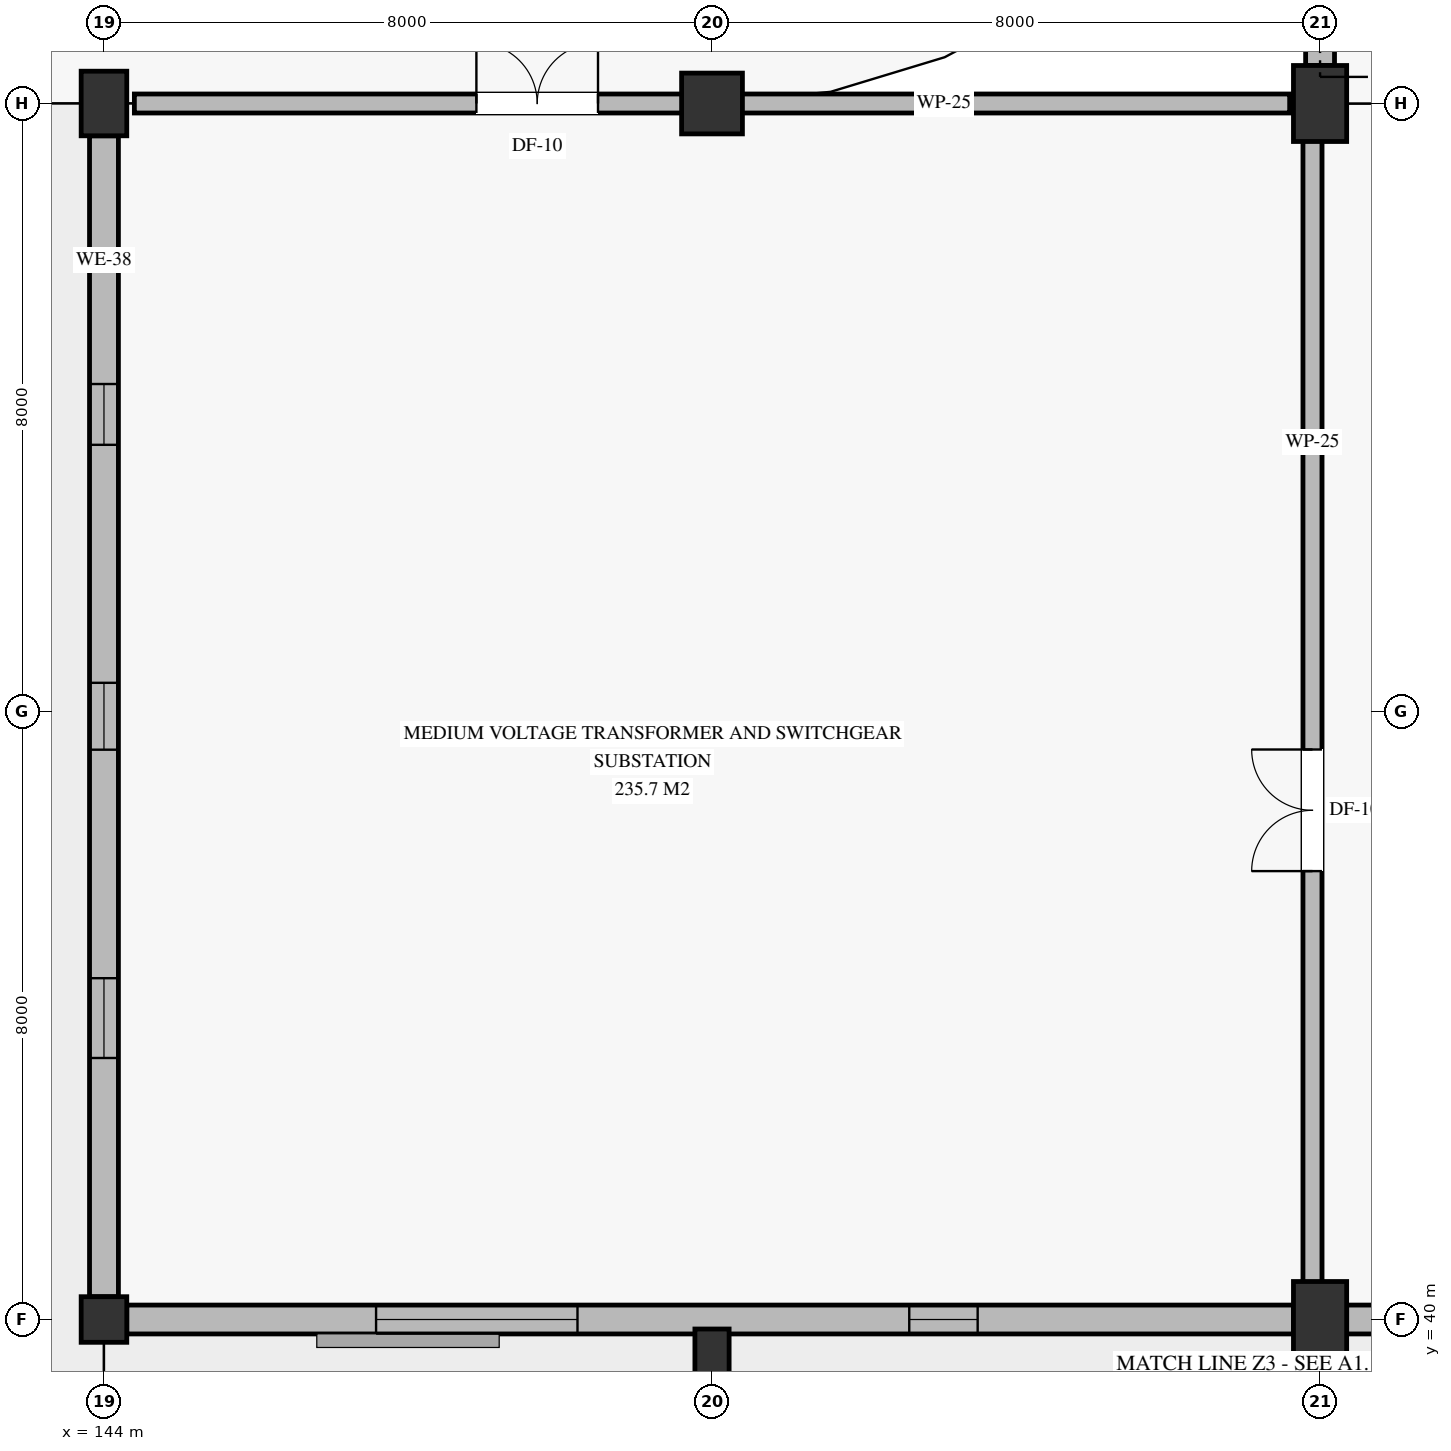
"""IFC4 building model, lengths in metres.
Left out: names, types, materials, properties, quantities, classifications, styles, units other than length and angle.
Written with IfcOpenShell. Run it as: python <this file> out.ifc"""

import sys

from ifc_helpers import new_model, si_unit, direction, frame, frame_2d, origin, origin_2d, place, context, subcontext, project, spatial, rectangle, extrude, element, fill, save


model = new_model("IFC4")
c1 = context("Model", 3, precision=1e-05, world=origin(), true_north=direction((0.0, 1.0)))
c2 = subcontext(c1, "Body", "Model", "MODEL_VIEW")
j1 = project(units=[si_unit("LENGTHUNIT", "METRE"), si_unit("PLANEANGLEUNIT", "RADIAN")], contexts=[c1])
p1 = place(None, origin())
s1 = spatial("IfcSite", under=j1, at=p1, CompositionType="ELEMENT")
p2 = place(p1, origin())
s2 = spatial("IfcBuilding", under=s1, at=p2, CompositionType="ELEMENT")
p3 = place(p2, origin())
s3 = spatial("IfcBuildingStorey", under=s2, at=p3, CompositionType="ELEMENT", Elevation=0.0)
p4 = place(p3, frame((144.0, 56.0, 0.0), z_axis=(0.0, 0.0, 1.0), x_axis=(1.0, 0.0, 0.0)))
e1 = element("IfcColumn", 1, at=p4, inside=s3, PredefinedType="COLUMN", context=c2, shape_type="SweptSolid", body=[
    extrude(rectangle(XDim=0.6, YDim=0.85, at=origin_2d()), origin(), (0.0, 0.0, 1.0), 4.8),
])
p5 = place(p3, frame((152.0, 56.0, 0.0), z_axis=(0.0, 0.0, 1.0), x_axis=(1.0, 0.0, 0.0)))
e2 = element("IfcColumn", 2, at=p5, inside=s3, PredefinedType="COLUMN", context=c2, shape_type="SweptSolid", body=[
    extrude(rectangle(XDim=0.8, YDim=0.8, at=origin_2d()), origin(), (0.0, 0.0, 1.0), 4.8),
])
p6 = place(p3, frame((144.0, 40.0, 0.0), z_axis=(0.0, 0.0, 1.0), x_axis=(1.0, 0.0, 0.0)))
e3 = element("IfcColumn", 3, at=p6, inside=s3, PredefinedType="COLUMN", context=c2, shape_type="SweptSolid", body=[
    extrude(rectangle(XDim=0.6, YDim=0.6, at=origin_2d()), origin(), (0.0, 0.0, 1.0), 4.8),
])
for number, where, z_axis, x_axis in (
    (4, (160.0, 40.0, 0.0), (0.0, 0.0, 1.0), (1.0, 0.0, 0.0)),
    (5, (160.0, 56.0, 0.0), (0.0, 0.0, 1.0), (1.0, 0.0, 0.0)),
):
    element("IfcColumn", number, at=place(p3, frame(where, z_axis=z_axis, x_axis=x_axis)), inside=s3, PredefinedType="COLUMN", context=c2, shape_type="SweptSolid", body=[
        extrude(rectangle(XDim=0.7, YDim=1.0, at=origin_2d()), origin(), (0.0, 0.0, 1.0), 4.8),
    ])
p7 = place(p3, frame((152.0, 39.55, 0.0), z_axis=(0.0, 0.0, 1.0), x_axis=(1.0, 0.0, 0.0)))
e6 = element("IfcColumn", 6, at=p7, inside=s3, PredefinedType="PILASTER", context=c2, shape_type="SweptSolid", body=[
    extrude(rectangle(XDim=0.45, YDim=0.65, at=origin_2d()), origin(), (0.0, 0.0, 1.0), 4.8),
])
p8 = place(p3, frame((173.65, 40.0, 0.0), z_axis=(0.0, 0.0, 1.0), x_axis=(-1.0, 0.0, 0.0)))
e7 = element("IfcWall", 7, at=p8, inside=s3, PredefinedType="STANDARD", context=c2, shape_type="SweptSolid", body=[
    extrude(rectangle(XDim=13.3, YDim=0.38, at=frame_2d((6.65, 0.0))), origin(), (0.0, 0.0, 1.0), 3.17),
])
p9 = place(p8, frame((3.465, 0.0, 0.45)))
e8 = element("IfcOpeningElement", 8, at=p9, cuts=e7, PredefinedType="OPENING", context=c2, shape_type="SweptSolid", body=[
    extrude(rectangle(XDim=1.05, YDim=2.5, at=frame_2d((0.525, 1.25))), frame((0.0, 0.2, 0.0), z_axis=(0.0, -1.0, 0.0), x_axis=(1.0, 0.0, 0.0)), (0.0, 0.0, 1.0), 0.4),
])
p10 = place(p8, frame((8.135, 0.0, 0.85)))
e9 = element("IfcOpeningElement", 9, at=p10, cuts=e7, PredefinedType="OPENING", context=c2, shape_type="SweptSolid", body=[
    extrude(rectangle(XDim=2.35, YDim=1.95, at=frame_2d((1.175, 0.975))), frame((0.0, 0.2, 0.0), z_axis=(0.0, -1.0, 0.0), x_axis=(1.0, 0.0, 0.0)), (0.0, 0.0, 1.0), 0.4),
])
p11 = place(p3, frame((159.65, 40.0, 0.0), z_axis=(0.0, 0.0, 1.0), x_axis=(-1.0, 0.0, 0.0)))
e10 = element("IfcWall", 10, at=p11, inside=s3, PredefinedType="STANDARD", context=c2, shape_type="SweptSolid", body=[
    extrude(rectangle(XDim=15.35, YDim=0.38, at=frame_2d((7.675, 0.0))), origin(), (0.0, 0.0, 1.0), 3.17),
])
p12 = place(p11, frame((4.155, 0.0, 0.6)))
e11 = element("IfcOpeningElement", 11, at=p12, cuts=e10, PredefinedType="OPENING", context=c2, shape_type="SweptSolid", body=[
    extrude(rectangle(XDim=0.9, YDim=2.35, at=frame_2d((0.45, 1.175))), frame((0.0, 0.2, 0.0), z_axis=(0.0, -1.0, 0.0), x_axis=(1.0, 0.0, 0.0)), (0.0, 0.0, 1.0), 0.4),
])
p13 = place(p11, frame((9.42, 0.0, 0.8)))
e12 = element("IfcOpeningElement", 12, at=p13, cuts=e10, PredefinedType="OPENING", context=c2, shape_type="SweptSolid", body=[
    extrude(rectangle(XDim=2.65, YDim=2.15, at=frame_2d((1.325, 1.075))), frame((0.0, 0.2, 0.0), z_axis=(0.0, -1.0, 0.0), x_axis=(1.0, 0.0, 0.0)), (0.0, 0.0, 1.0), 0.4),
])
p14 = place(p3, frame((144.0, 40.3, 0.0), z_axis=(0.0, 0.0, 1.0), x_axis=(0.0, 1.0, 0.0)))
e13 = element("IfcWall", 13, at=p14, inside=s3, PredefinedType="STANDARD", context=c2, shape_type="SweptSolid", body=[
    extrude(rectangle(XDim=15.275, YDim=0.38, at=frame_2d((7.637, 0.0))), origin(), (0.0, 0.0, 1.0), 2.97),
])
p15 = place(p14, frame((3.141, 0.0, 0.35)))
e14 = element("IfcOpeningElement", 14, at=p15, cuts=e13, PredefinedType="OPENING", context=c2, shape_type="SweptSolid", body=[
    extrude(rectangle(XDim=1.05, YDim=2.44, at=frame_2d((0.525, 1.22))), frame((0.0, 0.2, 0.0), z_axis=(0.0, -1.0, 0.0), x_axis=(1.0, 0.0, 0.0)), (0.0, 0.0, 1.0), 0.4),
])
p16 = place(p14, frame((7.198, 0.0, 0.8)))
e15 = element("IfcOpeningElement", 15, at=p16, cuts=e13, PredefinedType="OPENING", context=c2, shape_type="SweptSolid", body=[
    extrude(rectangle(XDim=0.88, YDim=1.95, at=frame_2d((0.44, 0.975))), frame((0.0, 0.2, 0.0), z_axis=(0.0, -1.0, 0.0), x_axis=(1.0, 0.0, 0.0)), (0.0, 0.0, 1.0), 0.4),
])
p17 = place(p14, frame((11.209, 0.0, 0.7)))
e16 = element("IfcOpeningElement", 16, at=p17, cuts=e13, PredefinedType="OPENING", context=c2, shape_type="SweptSolid", body=[
    extrude(rectangle(XDim=0.8, YDim=2.05, at=frame_2d((0.4, 1.025))), frame((0.0, 0.2, 0.0), z_axis=(0.0, -1.0, 0.0), x_axis=(1.0, 0.0, 0.0)), (0.0, 0.0, 1.0), 0.4),
])
p18 = place(p3, frame((160.0, 56.5, 0.0), z_axis=(0.0, 0.0, 1.0), x_axis=(0.0, 1.0, 0.0)))
e17 = element("IfcWall", 17, at=p18, inside=s3, PredefinedType="STANDARD", context=c2, shape_type="SweptSolid", body=[
    extrude(rectangle(XDim=15.0, YDim=0.38, at=frame_2d((7.5, 0.0))), origin(), (0.0, 0.0, 1.0), 3.7),
])
p19 = place(p18, frame((10.575, 0.0, 0.85)))
e18 = element("IfcOpeningElement", 18, at=p19, cuts=e17, PredefinedType="OPENING", context=c2, shape_type="SweptSolid", body=[
    extrude(rectangle(XDim=1.05, YDim=2.5, at=frame_2d((0.525, 1.25))), frame((0.0, 0.2, 0.0), z_axis=(0.0, -1.0, 0.0), x_axis=(1.0, 0.0, 0.0)), (0.0, 0.0, 1.0), 0.4),
])
p20 = place(p18, frame((2.2, 0.0, 0.0)))
e19 = element("IfcOpeningElement", 19, at=p20, cuts=e17, PredefinedType="OPENING", context=c2, shape_type="SweptSolid", body=[
    extrude(rectangle(XDim=2.2, YDim=2.6, at=frame_2d((1.1, 1.3))), frame((0.0, 0.2, 0.0), z_axis=(0.0, -1.0, 0.0), x_axis=(1.0, 0.0, 0.0)), (0.0, 0.0, 1.0), 0.4),
])
p21 = place(p3, frame((159.9, 40.4, 0.0), z_axis=(0.0, 0.0, 1.0), x_axis=(0.0, 1.0, 0.0)))
e20 = element("IfcWall", 20, at=p21, inside=s3, PredefinedType="PARTITIONING", context=c2, shape_type="SweptSolid", body=[
    extrude(rectangle(XDim=15.2, YDim=0.25, at=frame_2d((7.6, 0.0))), origin(), (0.0, 0.0, 1.0), 2.962),
])
p22 = place(p21, frame((5.5, 0.0, 0.0)))
e21 = element("IfcOpeningElement", 21, at=p22, cuts=e20, PredefinedType="OPENING", context=c2, shape_type="SweptSolid", body=[
    extrude(rectangle(XDim=1.6, YDim=2.3, at=frame_2d((0.8, 1.15))), frame((0.0, 0.135, 0.0), z_axis=(0.0, -1.0, 0.0), x_axis=(1.0, 0.0, 0.0)), (0.0, 0.0, 1.0), 0.27),
])
p23 = place(p3, frame((144.4, 56.0, 0.0), z_axis=(0.0, 0.0, 1.0), x_axis=(1.0, 0.0, 0.0)))
e22 = element("IfcWall", 22, at=p23, inside=s3, PredefinedType="PARTITIONING", context=c2, shape_type="SweptSolid", body=[
    extrude(rectangle(XDim=15.2, YDim=0.25, at=frame_2d((7.6, 0.0))), origin(), (0.0, 0.0, 1.0), 2.842),
])
p24 = place(p23, frame((4.5, 0.0, 0.0)))
e23 = element("IfcOpeningElement", 23, at=p24, cuts=e22, PredefinedType="OPENING", context=c2, shape_type="SweptSolid", body=[
    extrude(rectangle(XDim=1.6, YDim=2.3, at=frame_2d((0.8, 1.15))), frame((0.0, 0.135, 0.0), z_axis=(0.0, -1.0, 0.0), x_axis=(1.0, 0.0, 0.0)), (0.0, 0.0, 1.0), 0.27),
])
p25 = place(p12, origin())
e24 = element("IfcWindow", 24, at=p25, inside=s3, PartitioningType="SINGLE_PANEL", PredefinedType="WINDOW", context=c2, shape_type="SweptSolid", body=[
    extrude(rectangle(XDim=0.9, YDim=2.35, at=frame_2d((0.45, 1.175))), frame((0.0, 0.03, 0.0), z_axis=(0.0, -1.0, 0.0), x_axis=(1.0, 0.0, 0.0)), (0.0, 0.0, 1.0), 0.06),
])
fill(e11, e24)
p26 = place(p13, origin())
e25 = element("IfcWindow", 25, at=p26, inside=s3, PartitioningType="SINGLE_PANEL", PredefinedType="WINDOW", context=c2, shape_type="SweptSolid", body=[
    extrude(rectangle(XDim=2.65, YDim=2.15, at=frame_2d((1.325, 1.075))), frame((0.0, 0.03, 0.0), z_axis=(0.0, -1.0, 0.0), x_axis=(1.0, 0.0, 0.0)), (0.0, 0.0, 1.0), 0.06),
])
fill(e12, e25)
p27 = place(p15, origin())
e26 = element("IfcWindow", 26, at=p27, inside=s3, PartitioningType="SINGLE_PANEL", PredefinedType="WINDOW", context=c2, shape_type="SweptSolid", body=[
    extrude(rectangle(XDim=1.05, YDim=2.44, at=frame_2d((0.525, 1.22))), frame((0.0, 0.03, 0.0), z_axis=(0.0, -1.0, 0.0), x_axis=(1.0, 0.0, 0.0)), (0.0, 0.0, 1.0), 0.06),
])
fill(e14, e26)
p28 = place(p16, origin())
e27 = element("IfcWindow", 27, at=p28, inside=s3, PartitioningType="SINGLE_PANEL", PredefinedType="WINDOW", context=c2, shape_type="SweptSolid", body=[
    extrude(rectangle(XDim=0.88, YDim=1.95, at=frame_2d((0.44, 0.975))), frame((0.0, 0.03, 0.0), z_axis=(0.0, -1.0, 0.0), x_axis=(1.0, 0.0, 0.0)), (0.0, 0.0, 1.0), 0.06),
])
fill(e15, e27)
p29 = place(p17, origin())
e28 = element("IfcWindow", 28, at=p29, inside=s3, PartitioningType="SINGLE_PANEL", PredefinedType="WINDOW", context=c2, shape_type="SweptSolid", body=[
    extrude(rectangle(XDim=0.8, YDim=2.05, at=frame_2d((0.4, 1.025))), frame((0.0, 0.03, 0.0), z_axis=(0.0, -1.0, 0.0), x_axis=(1.0, 0.0, 0.0)), (0.0, 0.0, 1.0), 0.06),
])
fill(e16, e28)
p30 = place(p22, origin())
e29 = element("IfcDoor", 29, at=p30, inside=s3, OperationType="DOUBLE_DOOR_SINGLE_SWING", PredefinedType="DOOR", context=c2, shape_type="SweptSolid", body=[
    extrude(rectangle(XDim=1.6, YDim=2.3, at=frame_2d((0.8, 1.15))), frame((0.0, 0.025, 0.0), z_axis=(0.0, -1.0, 0.0), x_axis=(1.0, 0.0, 0.0)), (0.0, 0.0, 1.0), 0.05),
])
fill(e21, e29)
p31 = place(p24, origin())
e30 = element("IfcDoor", 30, at=p31, inside=s3, OperationType="DOUBLE_DOOR_SINGLE_SWING", PredefinedType="DOOR", context=c2, shape_type="SweptSolid", body=[
    extrude(rectangle(XDim=1.6, YDim=2.3, at=frame_2d((0.8, 1.15))), frame((0.0, 0.025, 0.0), z_axis=(0.0, -1.0, 0.0), x_axis=(1.0, 0.0, 0.0)), (0.0, 0.0, 1.0), 0.05),
])
fill(e23, e30)
save(model, sys.argv[1])
